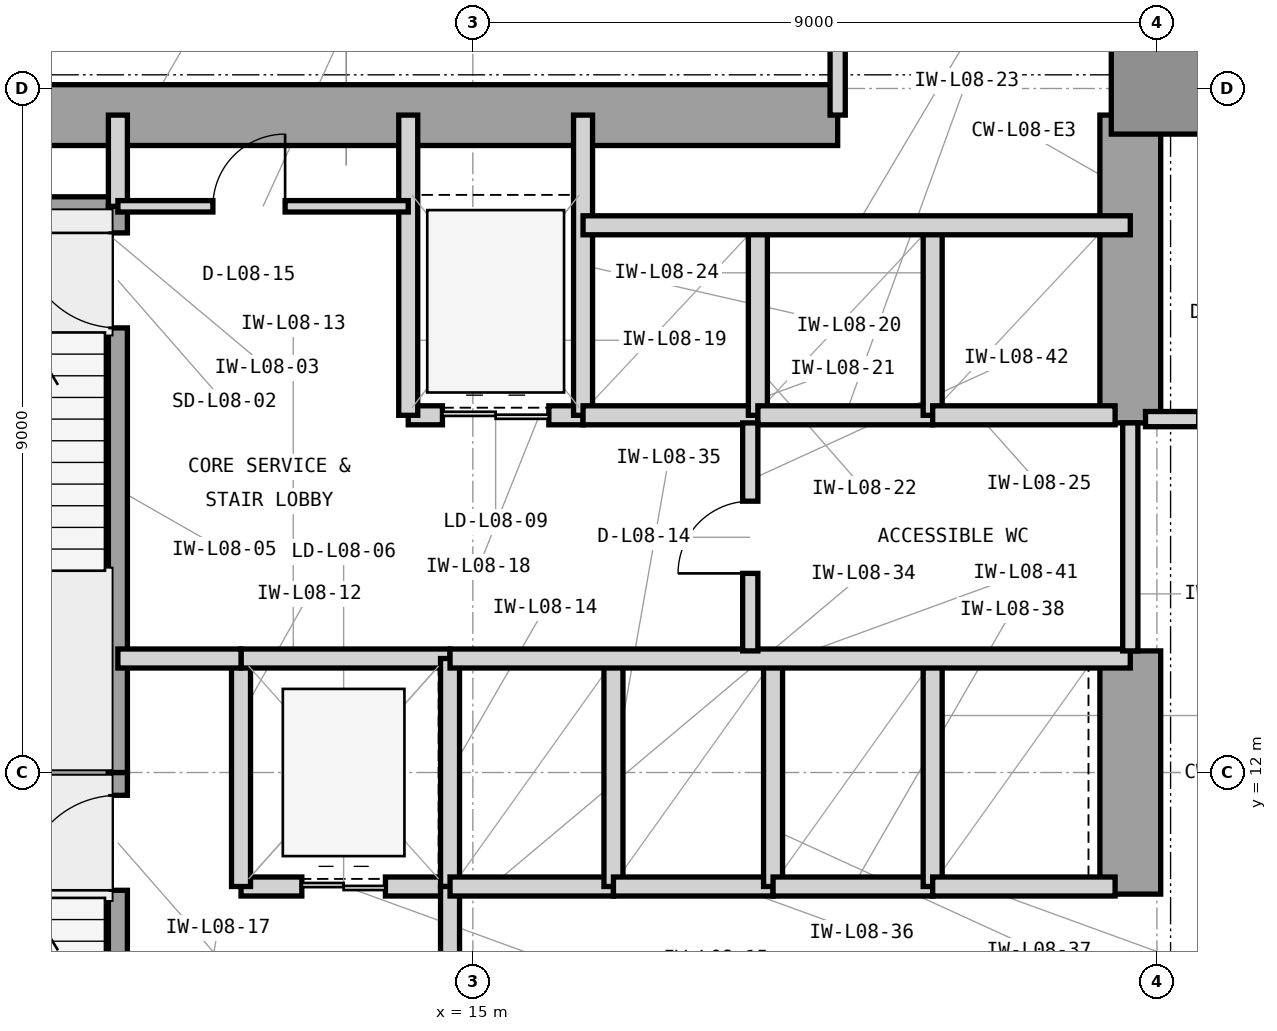
"""IFC4 building model, lengths in metres.
Left out: names, types, materials, properties, quantities, classifications, styles, units other than length and angle.
Written with IfcOpenShell. Run it as: python <this file> out.ifc"""

import sys

from ifc_helpers import new_model, si_unit, direction, frame, frame_2d, origin, origin_2d, place, context, subcontext, project, spatial, rectangle, extrude, element, fill, save


model = new_model("IFC4")
c1 = context("Model", 3, precision=1e-05, world=origin(), true_north=direction((0.0, 1.0)))
c2 = subcontext(c1, "Body", "Model", "MODEL_VIEW")
j1 = project(units=[si_unit("LENGTHUNIT", "METRE"), si_unit("PLANEANGLEUNIT", "RADIAN")], contexts=[c1])
p1 = place(None, origin())
s1 = spatial("IfcSite", under=j1, at=p1, CompositionType="ELEMENT")
p2 = place(p1, origin())
s2 = spatial("IfcBuilding", under=s1, at=p2, CompositionType="ELEMENT")
p3 = place(p2, frame((0.0, 0.0, 38.4)))
s3 = spatial("IfcBuildingStorey", under=s2, at=p3, CompositionType="ELEMENT", Elevation=38.4)
p4 = place(p3, frame((7.475, 20.65, 0.0), z_axis=(0.0, 0.0, 1.0), x_axis=(1.0, 0.0, 0.0)))
e1 = element("IfcWall", 1, at=p4, inside=s3, PredefinedType="SHEAR", context=c2, shape_type="SweptSolid", body=[
    extrude(rectangle(XDim=12.325, YDim=0.8, at=frame_2d((6.163, 0.0))), origin(), (0.0, 0.0, 1.0), 4.2),
])
p5 = place(p3, frame((23.65, 10.4, 0.0), z_axis=(0.0, 0.0, 1.0), x_axis=(0.0, 1.0, 0.0)))
e2 = element("IfcWall", 2, at=p5, inside=s3, PredefinedType="SHEAR", context=c2, shape_type="SweptSolid", body=[
    extrude(rectangle(XDim=3.2, YDim=0.8, at=frame_2d((1.6, 0.0))), origin(), (0.0, 0.0, 1.0), 4.2),
])
p6 = place(p3, frame((23.65, 16.6, 0.0), z_axis=(0.0, 0.0, 1.0), x_axis=(0.0, 1.0, 0.0)))
e3 = element("IfcWall", 3, at=p6, inside=s3, PredefinedType="SHEAR", context=c2, shape_type="SweptSolid", body=[
    extrude(rectangle(XDim=4.05, YDim=0.8, at=frame_2d((2.025, 0.0))), origin(), (0.0, 0.0, 1.0), 4.2),
])
p7 = place(p3, frame((24.0, 21.0, 0.0), z_axis=(0.0, 0.0, 1.0), x_axis=(1.0, 0.0, 0.0)))
e4 = element("IfcColumn", 4, at=p7, inside=s3, PredefinedType="COLUMN", context=c2, shape_type="SweptSolid", body=[
    extrude(rectangle(XDim=1.2, YDim=1.2, at=origin_2d()), origin(), (0.0, 0.0, 1.0), 4.2),
])
p8 = place(p3, frame((64.4, 20.79, 0.0), z_axis=(0.0, 0.0, 1.0), x_axis=(-1.0, 0.0, 0.0)))
e5 = element("IfcWall", 5, at=p8, inside=s3, PredefinedType="STANDARD", context=c2, shape_type="SweptSolid", body=[
    extrude(rectangle(XDim=40.4, YDim=0.42, at=frame_2d((20.2, 0.0))), origin(), (0.0, 0.0, 1.0), 3.98),
])
p9 = place(p8, frame((26.375, 0.0, 0.85)))
e6 = element("IfcOpeningElement", 6, at=p9, cuts=e5, PredefinedType="OPENING", context=c2, shape_type="SweptSolid", body=[
    extrude(rectangle(XDim=2.8, YDim=2.45, at=frame_2d((1.4, 1.225))), frame((0.0, 0.22, 0.0), z_axis=(0.0, -1.0, 0.0), x_axis=(1.0, 0.0, 0.0)), (0.0, 0.0, 1.0), 0.44),
])
p10 = place(p8, frame((38.222, 0.0, 0.85)))
e7 = element("IfcOpeningElement", 7, at=p10, cuts=e5, PredefinedType="OPENING", context=c2, shape_type="SweptSolid", body=[
    extrude(rectangle(XDim=1.2, YDim=2.45, at=frame_2d((0.6, 1.225))), frame((0.0, 0.22, 0.0), z_axis=(0.0, -1.0, 0.0), x_axis=(1.0, 0.0, 0.0)), (0.0, 0.0, 1.0), 0.44),
])
p11 = place(p8, frame((32.536, 0.0, 0.85)))
e8 = element("IfcOpeningElement", 8, at=p11, cuts=e5, PredefinedType="OPENING", context=c2, shape_type="SweptSolid", body=[
    extrude(rectangle(XDim=2.8, YDim=2.45, at=frame_2d((1.4, 1.225))), frame((0.0, 0.22, 0.0), z_axis=(0.0, -1.0, 0.0), x_axis=(1.0, 0.0, 0.0)), (0.0, 0.0, 1.0), 0.44),
])
p12 = place(p8, frame((17.386, 0.0, 0.85)))
e9 = element("IfcOpeningElement", 9, at=p12, cuts=e5, PredefinedType="OPENING", context=c2, shape_type="SweptSolid", body=[
    extrude(rectangle(XDim=2.8, YDim=2.45, at=frame_2d((1.4, 1.225))), frame((0.0, 0.22, 0.0), z_axis=(0.0, -1.0, 0.0), x_axis=(1.0, 0.0, 0.0)), (0.0, 0.0, 1.0), 0.44),
])
p13 = place(p3, frame((23.79, 21.0, 0.0), z_axis=(0.0, 0.0, 1.0), x_axis=(0.0, 1.0, 0.0)))
e10 = element("IfcWall", 10, at=p13, inside=s3, PredefinedType="STANDARD", context=c2, shape_type="SweptSolid", body=[
    extrude(rectangle(XDim=28.4, YDim=0.42, at=frame_2d((14.2, 0.0))), origin(), (0.0, 0.0, 1.0), 3.98),
])
p14 = place(p13, frame((10.433, 0.0, 0.85)))
e11 = element("IfcOpeningElement", 11, at=p14, cuts=e10, PredefinedType="OPENING", context=c2, shape_type="SweptSolid", body=[
    extrude(rectangle(XDim=2.8, YDim=2.45, at=frame_2d((1.4, 1.225))), frame((0.0, 0.22, 0.0), z_axis=(0.0, -1.0, 0.0), x_axis=(1.0, 0.0, 0.0)), (0.0, 0.0, 1.0), 0.44),
])
p15 = place(p13, frame((16.016, 0.0, 0.85)))
e12 = element("IfcOpeningElement", 12, at=p15, cuts=e10, PredefinedType="OPENING", context=c2, shape_type="SweptSolid", body=[
    extrude(rectangle(XDim=1.2, YDim=2.45, at=frame_2d((0.6, 1.225))), frame((0.0, 0.22, 0.0), z_axis=(0.0, -1.0, 0.0), x_axis=(1.0, 0.0, 0.0)), (0.0, 0.0, 1.0), 0.44),
])
p16 = place(p3, frame((6.35, 12.0, 0.0), z_axis=(0.0, 0.0, 1.0), x_axis=(1.0, 0.0, 0.0)))
e13 = element("IfcWall", 13, at=p16, inside=s3, PredefinedType="SHEAR", context=c2, shape_type="SweptSolid", body=[
    extrude(rectangle(XDim=4.105, YDim=0.25, at=frame_2d((2.052, 0.0))), origin(), (0.0, 0.0, 1.0), 4.2),
])
p17 = place(p3, frame((7.7, 19.45, 0.0), z_axis=(0.0, 0.0, 1.0), x_axis=(1.0, 0.0, 0.0)))
e14 = element("IfcWall", 14, at=p17, inside=s3, PredefinedType="SHEAR", context=c2, shape_type="SweptSolid", body=[
    extrude(rectangle(XDim=2.755, YDim=0.25, at=frame_2d((1.377, 0.0))), origin(), (0.0, 0.0, 1.0), 4.2),
])
p18 = place(p3, frame((10.33, 4.55, 0.0), z_axis=(0.0, 0.0, 1.0), x_axis=(0.0, 1.0, 0.0)))
e15 = element("IfcWall", 15, at=p18, inside=s3, PredefinedType="SHEAR", context=c2, shape_type="SweptSolid", body=[
    extrude(rectangle(XDim=7.45, YDim=0.25, at=frame_2d((3.725, 0.0))), origin(), (0.0, 0.0, 1.0), 4.2),
])
p19 = place(p18, frame((5.9, 0.0, 0.0)))
e16 = element("IfcOpeningElement", 16, at=p19, cuts=e15, PredefinedType="OPENING", context=c2, shape_type="SweptSolid", body=[
    extrude(rectangle(XDim=1.25, YDim=2.2, at=frame_2d((0.625, 1.1))), frame((0.0, 0.135, 0.0), z_axis=(0.0, -1.0, 0.0), x_axis=(1.0, 0.0, 0.0)), (0.0, 0.0, 1.0), 0.27),
])
p20 = place(p3, frame((10.33, 12.0, 0.0), z_axis=(0.0, 0.0, 1.0), x_axis=(0.0, 1.0, 0.0)))
e17 = element("IfcWall", 17, at=p20, inside=s3, PredefinedType="SHEAR", context=c2, shape_type="SweptSolid", body=[
    extrude(rectangle(XDim=7.45, YDim=0.25, at=frame_2d((3.725, 0.0))), origin(), (0.0, 0.0, 1.0), 4.2),
])
p21 = place(p20, frame((5.85, 0.0, 0.0)))
e18 = element("IfcOpeningElement", 18, at=p21, cuts=e17, PredefinedType="OPENING", context=c2, shape_type="SweptSolid", body=[
    extrude(rectangle(XDim=1.25, YDim=2.2, at=frame_2d((0.625, 1.1))), frame((0.0, 0.135, 0.0), z_axis=(0.0, -1.0, 0.0), x_axis=(1.0, 0.0, 0.0)), (0.0, 0.0, 1.0), 0.27),
])
p22 = place(p3, frame((10.33, 19.45, 0.0), z_axis=(0.0, 0.0, 1.0), x_axis=(0.0, 1.0, 0.0)))
e19 = element("IfcWall", 19, at=p22, inside=s3, PredefinedType="PARTITIONING", context=c2, shape_type="SweptSolid", body=[
    extrude(rectangle(XDim=1.2, YDim=0.25, at=frame_2d((0.6, 0.0))), origin(), (0.0, 0.0, 1.0), 3.114),
])
p23 = place(p3, frame((11.95, 10.5, 0.0), z_axis=(0.0, 0.0, 1.0), x_axis=(1.0, 0.0, 0.0)))
e20 = element("IfcWall", 20, at=p23, inside=s3, PredefinedType="PARTITIONING", context=c2, shape_type="SweptSolid", body=[
    extrude(rectangle(XDim=2.75, YDim=0.25, at=frame_2d((1.375, 0.0))), origin(), (0.0, 0.0, 1.0), 3.426),
])
p24 = place(p23, frame((0.8, 0.0, 0.0)))
e21 = element("IfcOpeningElement", 21, at=p24, cuts=e20, PredefinedType="OPENING", context=c2, shape_type="SweptSolid", body=[
    extrude(rectangle(XDim=1.1, YDim=2.25, at=frame_2d((0.55, 1.125))), frame((0.0, 0.135, 0.0), z_axis=(0.0, -1.0, 0.0), x_axis=(1.0, 0.0, 0.0)), (0.0, 0.0, 1.0), 0.27),
])
p25 = place(p3, frame((11.95, 10.5, 0.0), z_axis=(0.0, 0.0, 1.0), x_axis=(0.0, 1.0, 0.0)))
e22 = element("IfcWall", 22, at=p25, inside=s3, PredefinedType="PARTITIONING", context=c2, shape_type="SweptSolid", body=[
    extrude(rectangle(XDim=3.0, YDim=0.25, at=frame_2d((1.5, 0.0))), origin(), (0.0, 0.0, 1.0), 3.97),
])
p26 = place(p3, frame((11.95, 13.5, 0.0), z_axis=(0.0, 0.0, 1.0), x_axis=(1.0, 0.0, 0.0)))
e23 = element("IfcWall", 23, at=p26, inside=s3, PredefinedType="PARTITIONING", context=c2, shape_type="SweptSolid", body=[
    extrude(rectangle(XDim=2.75, YDim=0.25, at=frame_2d((1.375, 0.0))), origin(), (0.0, 0.0, 1.0), 3.426),
])
p27 = place(p3, frame((14.7, 10.5, 0.0), z_axis=(0.0, 0.0, 1.0), x_axis=(0.0, 1.0, 0.0)))
e24 = element("IfcWall", 24, at=p27, inside=s3, PredefinedType="PARTITIONING", context=c2, shape_type="SweptSolid", body=[
    extrude(rectangle(XDim=3.0, YDim=0.25, at=frame_2d((1.5, 0.0))), origin(), (0.0, 0.0, 1.0), 3.97),
])
p28 = place(p3, frame((14.7, 6.7, 0.0), z_axis=(0.0, 0.0, 1.0), x_axis=(0.0, 1.0, 0.0)))
e25 = element("IfcWall", 25, at=p28, inside=s3, PredefinedType="PARTITIONING", context=c2, shape_type="SweptSolid", body=[
    extrude(rectangle(XDim=3.8, YDim=0.25, at=frame_2d((1.9, 0.0))), origin(), (0.0, 0.0, 1.0), 3.97),
])
p29 = place(p28, frame((1.3, 0.0, 0.0)))
e26 = element("IfcOpeningElement", 26, at=p29, cuts=e25, PredefinedType="OPENING", context=c2, shape_type="SweptSolid", body=[
    extrude(rectangle(XDim=1.2, YDim=2.2, at=frame_2d((0.6, 1.1))), frame((0.0, 0.135, 0.0), z_axis=(0.0, -1.0, 0.0), x_axis=(1.0, 0.0, 0.0)), (0.0, 0.0, 1.0), 0.27),
])
p30 = place(p3, frame((10.33, 13.5, 0.0), z_axis=(0.0, 0.0, 1.0), x_axis=(1.0, 0.0, 0.0)))
e27 = element("IfcWall", 27, at=p30, inside=s3, PredefinedType="PARTITIONING", context=c2, shape_type="SweptSolid", body=[
    extrude(rectangle(XDim=1.62, YDim=0.25, at=frame_2d((0.81, 0.0))), origin(), (0.0, 0.0, 1.0), 3.426),
])
p31 = place(p3, frame((14.15, 16.7, 0.0), z_axis=(0.0, 0.0, 1.0), x_axis=(1.0, 0.0, 0.0)))
e28 = element("IfcWall", 28, at=p31, inside=s3, PredefinedType="PARTITIONING", context=c2, shape_type="SweptSolid", body=[
    extrude(rectangle(XDim=2.3, YDim=0.25, at=frame_2d((1.15, 0.0))), origin(), (0.0, 0.0, 1.0), 3.426),
])
p32 = place(p31, frame((0.45, 0.0, 0.0)))
e29 = element("IfcOpeningElement", 29, at=p32, cuts=e28, PredefinedType="OPENING", context=c2, shape_type="SweptSolid", body=[
    extrude(rectangle(XDim=1.4, YDim=2.35, at=frame_2d((0.7, 1.175))), frame((0.0, 0.135, 0.0), z_axis=(0.0, -1.0, 0.0), x_axis=(1.0, 0.0, 0.0)), (0.0, 0.0, 1.0), 0.27),
])
for number, where, z_axis, x_axis in (
    (30, (14.15, 16.7, 0.0), (0.0, 0.0, 1.0), (0.0, 1.0, 0.0)),
    (31, (16.45, 16.7, 0.0), (0.0, 0.0, 1.0), (0.0, 1.0, 0.0)),
):
    element("IfcWall", number, at=place(p3, frame(where, z_axis=z_axis, x_axis=x_axis)), inside=s3, PredefinedType="PARTITIONING", context=c2, shape_type="SweptSolid", body=[
        extrude(rectangle(XDim=3.95, YDim=0.25, at=frame_2d((1.975, 0.0))), origin(), (0.0, 0.0, 1.0), 3.97),
    ])
p33 = place(p3, frame((16.45, 16.7, 0.0), z_axis=(0.0, 0.0, 1.0), x_axis=(1.0, 0.0, 0.0)))
e32 = element("IfcWall", 32, at=p33, inside=s3, PredefinedType="PARTITIONING", context=c2, shape_type="SweptSolid", body=[
    extrude(rectangle(XDim=2.3, YDim=0.25, at=frame_2d((1.15, 0.0))), origin(), (0.0, 0.0, 1.0), 3.426),
])
p34 = place(p3, frame((18.75, 16.7, 0.0), z_axis=(0.0, 0.0, 1.0), x_axis=(0.0, 1.0, 0.0)))
e33 = element("IfcWall", 33, at=p34, inside=s3, PredefinedType="PARTITIONING", context=c2, shape_type="SweptSolid", body=[
    extrude(rectangle(XDim=2.5, YDim=0.25, at=frame_2d((1.25, 0.0))), origin(), (0.0, 0.0, 1.0), 3.97),
])
p35 = place(p3, frame((18.75, 16.7, 0.0), z_axis=(0.0, 0.0, 1.0), x_axis=(1.0, 0.0, 0.0)))
e34 = element("IfcWall", 34, at=p35, inside=s3, PredefinedType="PARTITIONING", context=c2, shape_type="SweptSolid", body=[
    extrude(rectangle(XDim=2.3, YDim=0.25, at=frame_2d((1.15, 0.0))), origin(), (0.0, 0.0, 1.0), 3.426),
])
p36 = place(p3, frame((21.05, 16.7, 0.0), z_axis=(0.0, 0.0, 1.0), x_axis=(0.0, 1.0, 0.0)))
e35 = element("IfcWall", 35, at=p36, inside=s3, PredefinedType="PARTITIONING", context=c2, shape_type="SweptSolid", body=[
    extrude(rectangle(XDim=2.5, YDim=0.25, at=frame_2d((1.25, 0.0))), origin(), (0.0, 0.0, 1.0), 3.97),
])
p37 = place(p3, frame((21.05, 16.7, 0.0), z_axis=(0.0, 0.0, 1.0), x_axis=(1.0, 0.0, 0.0)))
e36 = element("IfcWall", 36, at=p37, inside=s3, PredefinedType="PARTITIONING", context=c2, shape_type="SweptSolid", body=[
    extrude(rectangle(XDim=2.4, YDim=0.25, at=frame_2d((1.2, 0.0))), origin(), (0.0, 0.0, 1.0), 3.426),
])
p38 = place(p3, frame((16.45, 19.2, 0.0), z_axis=(0.0, 0.0, 1.0), x_axis=(1.0, 0.0, 0.0)))
e37 = element("IfcWall", 37, at=p38, inside=s3, PredefinedType="PARTITIONING", context=c2, shape_type="SweptSolid", body=[
    extrude(rectangle(XDim=7.2, YDim=0.25, at=frame_2d((3.6, 0.0))), origin(), (0.0, 0.0, 1.0), 3.97),
])
p39 = place(p3, frame((14.7, 10.5, 0.0), z_axis=(0.0, 0.0, 1.0), x_axis=(1.0, 0.0, 0.0)))
e38 = element("IfcWall", 38, at=p39, inside=s3, PredefinedType="PARTITIONING", context=c2, shape_type="SweptSolid", body=[
    extrude(rectangle(XDim=2.15, YDim=0.25, at=frame_2d((1.075, 0.0))), origin(), (0.0, 0.0, 1.0), 3.426),
])
p40 = place(p3, frame((16.85, 10.5, 0.0), z_axis=(0.0, 0.0, 1.0), x_axis=(0.0, 1.0, 0.0)))
e39 = element("IfcWall", 39, at=p40, inside=s3, PredefinedType="PARTITIONING", context=c2, shape_type="SweptSolid", body=[
    extrude(rectangle(XDim=3.0, YDim=0.25, at=frame_2d((1.5, 0.0))), origin(), (0.0, 0.0, 1.0), 3.97),
])
p41 = place(p3, frame((16.85, 10.5, 0.0), z_axis=(0.0, 0.0, 1.0), x_axis=(1.0, 0.0, 0.0)))
e40 = element("IfcWall", 40, at=p41, inside=s3, PredefinedType="PARTITIONING", context=c2, shape_type="SweptSolid", body=[
    extrude(rectangle(XDim=2.1, YDim=0.25, at=frame_2d((1.05, 0.0))), origin(), (0.0, 0.0, 1.0), 3.426),
])
p42 = place(p3, frame((18.95, 10.5, 0.0), z_axis=(0.0, 0.0, 1.0), x_axis=(0.0, 1.0, 0.0)))
e41 = element("IfcWall", 41, at=p42, inside=s3, PredefinedType="PARTITIONING", context=c2, shape_type="SweptSolid", body=[
    extrude(rectangle(XDim=3.0, YDim=0.25, at=frame_2d((1.5, 0.0))), origin(), (0.0, 0.0, 1.0), 3.97),
])
p43 = place(p3, frame((18.95, 10.5, 0.0), z_axis=(0.0, 0.0, 1.0), x_axis=(1.0, 0.0, 0.0)))
e42 = element("IfcWall", 42, at=p43, inside=s3, PredefinedType="PARTITIONING", context=c2, shape_type="SweptSolid", body=[
    extrude(rectangle(XDim=2.1, YDim=0.25, at=frame_2d((1.05, 0.0))), origin(), (0.0, 0.0, 1.0), 3.426),
])
p44 = place(p3, frame((21.05, 10.5, 0.0), z_axis=(0.0, 0.0, 1.0), x_axis=(0.0, 1.0, 0.0)))
e43 = element("IfcWall", 43, at=p44, inside=s3, PredefinedType="PARTITIONING", context=c2, shape_type="SweptSolid", body=[
    extrude(rectangle(XDim=3.0, YDim=0.25, at=frame_2d((1.5, 0.0))), origin(), (0.0, 0.0, 1.0), 3.97),
])
p45 = place(p3, frame((21.05, 10.5, 0.0), z_axis=(0.0, 0.0, 1.0), x_axis=(1.0, 0.0, 0.0)))
e44 = element("IfcWall", 44, at=p45, inside=s3, PredefinedType="PARTITIONING", context=c2, shape_type="SweptSolid", body=[
    extrude(rectangle(XDim=2.4, YDim=0.25, at=frame_2d((1.2, 0.0))), origin(), (0.0, 0.0, 1.0), 3.426),
])
p46 = place(p3, frame((14.7, 13.5, 0.0), z_axis=(0.0, 0.0, 1.0), x_axis=(1.0, 0.0, 0.0)))
e45 = element("IfcWall", 45, at=p46, inside=s3, PredefinedType="PARTITIONING", context=c2, shape_type="SweptSolid", body=[
    extrude(rectangle(XDim=8.95, YDim=0.25, at=frame_2d((4.475, 0.0))), origin(), (0.0, 0.0, 1.0), 3.426),
])
p47 = place(p3, frame((18.65, 13.6, 0.0), z_axis=(0.0, 0.0, 1.0), x_axis=(0.0, 1.0, 0.0)))
e46 = element("IfcWall", 46, at=p47, inside=s3, PredefinedType="PARTITIONING", context=c2, shape_type="SweptSolid", body=[
    extrude(rectangle(XDim=3.0, YDim=0.2, at=frame_2d((1.5, 0.0))), origin(), (0.0, 0.0, 1.0), 3.97),
])
p48 = place(p47, frame((1.02, 0.0, 0.0)))
e47 = element("IfcOpeningElement", 47, at=p48, cuts=e46, PredefinedType="OPENING", context=c2, shape_type="SweptSolid", body=[
    extrude(rectangle(XDim=0.95, YDim=2.1, at=frame_2d((0.475, 1.05))), frame((0.0, 0.11, 0.0), z_axis=(0.0, -1.0, 0.0), x_axis=(1.0, 0.0, 0.0)), (0.0, 0.0, 1.0), 0.22),
])
p49 = place(p3, frame((23.65, 13.6, 0.0), z_axis=(0.0, 0.0, 1.0), x_axis=(0.0, 1.0, 0.0)))
e48 = element("IfcWall", 48, at=p49, inside=s3, PredefinedType="PARTITIONING", context=c2, shape_type="SweptSolid", body=[
    extrude(rectangle(XDim=3.0, YDim=0.2, at=frame_2d((1.5, 0.0))), origin(), (0.0, 0.0, 1.0), 3.97),
])
p50 = place(p3, frame((10.33, 19.45, 0.0), z_axis=(0.0, 0.0, 1.0), x_axis=(1.0, 0.0, 0.0)))
e49 = element("IfcWall", 49, at=p50, inside=s3, PredefinedType="PARTITIONING", context=c2, shape_type="SweptSolid", body=[
    extrude(rectangle(XDim=3.82, YDim=0.15, at=frame_2d((1.91, 0.0))), origin(), (0.0, 0.0, 1.0), 3.97),
])
p51 = place(p50, frame((1.25, 0.0, 0.0)))
e50 = element("IfcOpeningElement", 50, at=p51, cuts=e49, PredefinedType="OPENING", context=c2, shape_type="SweptSolid", body=[
    extrude(rectangle(XDim=0.95, YDim=2.1, at=frame_2d((0.475, 1.05))), frame((0.0, 0.085, 0.0), z_axis=(0.0, -1.0, 0.0), x_axis=(1.0, 0.0, 0.0)), (0.0, 0.0, 1.0), 0.17),
])
p52 = place(p3, frame((23.85, 16.65, 0.0), z_axis=(0.0, 0.0, 1.0), x_axis=(1.0, 0.0, 0.0)))
e51 = element("IfcWall", 51, at=p52, inside=s3, PredefinedType="PARTITIONING", context=c2, shape_type="SweptSolid", body=[
    extrude(rectangle(XDim=2.85, YDim=0.2, at=frame_2d((1.425, 0.0))), origin(), (0.0, 0.0, 1.0), 3.97),
])
p53 = place(p52, frame((0.7, 0.0, 0.0)))
e52 = element("IfcOpeningElement", 52, at=p53, cuts=e51, PredefinedType="OPENING", context=c2, shape_type="SweptSolid", body=[
    extrude(rectangle(XDim=1.0, YDim=2.15, at=frame_2d((0.5, 1.075))), frame((0.0, 0.11, 0.0), z_axis=(0.0, -1.0, 0.0), x_axis=(1.0, 0.0, 0.0)), (0.0, 0.0, 1.0), 0.22),
])
p54 = place(p3, frame((19.8, 20.65, 0.0), z_axis=(0.0, 0.0, 1.0), x_axis=(0.0, 1.0, 0.0)))
e53 = element("IfcWall", 53, at=p54, inside=s3, PredefinedType="PARTITIONING", context=c2, shape_type="SweptSolid", body=[
    extrude(rectangle(XDim=6.15, YDim=0.2, at=frame_2d((3.075, 0.0))), origin(), (0.0, 0.0, 1.0), 3.97),
])
p55 = place(p19, origin())
e54 = element("IfcDoor", 54, at=p55, inside=s3, OperationType="SINGLE_SWING_LEFT", PredefinedType="DOOR", context=c2, shape_type="SweptSolid", body=[
    extrude(rectangle(XDim=1.25, YDim=2.2, at=frame_2d((0.625, 1.1))), frame((0.0, 0.025, 0.0), z_axis=(0.0, -1.0, 0.0), x_axis=(1.0, 0.0, 0.0)), (0.0, 0.0, 1.0), 0.05),
])
fill(e16, e54)
p56 = place(p21, origin())
e55 = element("IfcDoor", 55, at=p56, inside=s3, OperationType="SINGLE_SWING_RIGHT", PredefinedType="DOOR", context=c2, shape_type="SweptSolid", body=[
    extrude(rectangle(XDim=1.25, YDim=2.2, at=frame_2d((0.625, 1.1))), frame((0.0, 0.025, 0.0), z_axis=(0.0, -1.0, 0.0), x_axis=(1.0, 0.0, 0.0)), (0.0, 0.0, 1.0), 0.05),
])
fill(e18, e55)
p57 = place(p24, origin())
e56 = element("IfcDoor", 56, at=p57, inside=s3, OperationType="DOUBLE_DOOR_SLIDING", PredefinedType="DOOR", context=c2, shape_type="SweptSolid", body=[
    extrude(rectangle(XDim=1.1, YDim=2.25, at=frame_2d((0.55, 1.125))), frame((0.0, 0.025, 0.0), z_axis=(0.0, -1.0, 0.0), x_axis=(1.0, 0.0, 0.0)), (0.0, 0.0, 1.0), 0.05),
])
fill(e21, e56)
p58 = place(p32, origin())
e57 = element("IfcDoor", 57, at=p58, inside=s3, OperationType="DOUBLE_DOOR_SLIDING", PredefinedType="DOOR", context=c2, shape_type="SweptSolid", body=[
    extrude(rectangle(XDim=1.4, YDim=2.35, at=frame_2d((0.7, 1.175))), frame((0.0, 0.025, 0.0), z_axis=(0.0, -1.0, 0.0), x_axis=(1.0, 0.0, 0.0)), (0.0, 0.0, 1.0), 0.05),
])
fill(e29, e57)
p59 = place(p48, origin())
e58 = element("IfcDoor", 58, at=p59, inside=s3, OperationType="SINGLE_SWING_LEFT", PredefinedType="DOOR", context=c2, shape_type="SweptSolid", body=[
    extrude(rectangle(XDim=0.95, YDim=2.1, at=frame_2d((0.475, 1.05))), frame((0.0, 0.025, 0.0), z_axis=(0.0, -1.0, 0.0), x_axis=(1.0, 0.0, 0.0)), (0.0, 0.0, 1.0), 0.05),
])
fill(e47, e58)
p60 = place(p51, origin())
e59 = element("IfcDoor", 59, at=p60, inside=s3, OperationType="SINGLE_SWING_RIGHT", PredefinedType="DOOR", context=c2, shape_type="SweptSolid", body=[
    extrude(rectangle(XDim=0.95, YDim=2.1, at=frame_2d((0.475, 1.05))), frame((0.0, 0.025, 0.0), z_axis=(0.0, -1.0, 0.0), x_axis=(1.0, 0.0, 0.0)), (0.0, 0.0, 1.0), 0.05),
])
fill(e50, e59)
save(model, sys.argv[1])
